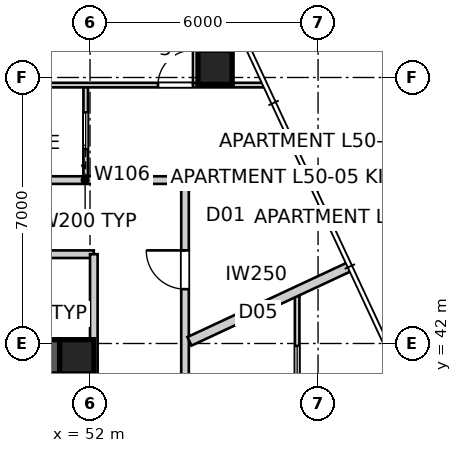
"""IFC4 building model, lengths in metres.
Left out: names, types, materials, properties, quantities, classifications, styles, units other than length and angle.
Written with IfcOpenShell. Run it as: python <this file> out.ifc"""

import sys

from ifc_helpers import new_model, si_unit, direction, frame, frame_2d, origin, origin_2d, place, context, subcontext, project, spatial, polyline, rectangle, outline, extrude, element, fill, save


model = new_model("IFC4")
c1 = context("Model", 3, precision=1e-05, world=origin(), true_north=direction((0.0, 1.0)))
c2 = subcontext(c1, "Body", "Model", "MODEL_VIEW")
j1 = project(units=[si_unit("LENGTHUNIT", "METRE"), si_unit("PLANEANGLEUNIT", "RADIAN")], contexts=[c1])
p1 = place(None, origin())
s1 = spatial("IfcSite", under=j1, at=p1, CompositionType="ELEMENT")
p2 = place(p1, origin())
s2 = spatial("IfcBuilding", under=s1, at=p2, CompositionType="ELEMENT")
p3 = place(p2, frame((0.0, 0.0, 182.8)))
s3 = spatial("IfcBuildingStorey", under=s2, at=p3, CompositionType="ELEMENT", Elevation=182.8)
p4 = place(p3, frame((28.8, 41.65, 0.0), z_axis=(0.0, 0.0, 1.0), x_axis=(1.0, 0.0, 0.0)))
e1 = element("IfcWall", 1, at=p4, inside=s3, PredefinedType="SHEAR", context=c2, shape_type="SweptSolid", body=[
    extrude(outline(polyline([(0.0, -0.45), (22.4, -0.45), (22.4, -0.025), (22.85, -0.025), (22.85, 0.025), (22.4, 0.025), (22.4, 0.45), (0.0, 0.45), (0.0, 0.025), (-0.45, 0.025), (-0.45, -0.025), (0.0, -0.025), (0.0, -0.45)])), origin(), (0.0, 0.0, 1.0), 3.4),
])
p5 = place(p3, frame((51.65, 18.8, 0.0), z_axis=(0.0, 0.0, 1.0), x_axis=(0.0, 1.0, 0.0)))
e2 = element("IfcWall", 2, at=p5, inside=s3, PredefinedType="SHEAR", context=c2, shape_type="SweptSolid", body=[
    extrude(outline(polyline([(0.0, -0.45), (22.4, -0.45), (22.4, -0.025), (22.85, -0.025), (22.85, 0.025), (22.4, 0.025), (22.4, 0.45), (0.0, 0.45), (0.0, 0.025), (-0.45, 0.025), (-0.45, -0.025), (0.0, -0.025), (0.0, -0.45)])), origin(), (0.0, 0.0, 1.0), 3.4),
])
p6 = place(p5, frame((11.14, 0.0, 0.0)))
e3 = element("IfcOpeningElement", 3, at=p6, cuts=e2, PredefinedType="OPENING", context=c2, shape_type="SweptSolid", body=[
    extrude(rectangle(XDim=1.02, YDim=2.4, at=frame_2d((0.51, 1.2))), frame((0.0, 0.46, 0.0), z_axis=(0.0, -1.0, 0.0), x_axis=(1.0, 0.0, 0.0)), (0.0, 0.0, 1.0), 0.92),
])
for number, where, z_axis, x_axis in (
    (4, (51.65, 41.65, 0.0), (0.0, 0.0, 1.0), (1.0, 0.0, 0.0)),
    (5, (55.29, 49.267, 0.0), (0.0, 0.0, 1.0), (1.0, 0.0, 0.0)),
):
    element("IfcColumn", number, at=place(p3, frame(where, z_axis=z_axis, x_axis=x_axis)), inside=s3, PredefinedType="COLUMN", context=c2, shape_type="SweptSolid", body=[
        extrude(rectangle(XDim=0.9, YDim=0.9, at=origin_2d()), origin(), (0.0, 0.0, 1.0), 3.4),
    ])
p7 = place(p3, frame((54.5, 13.7, 0.0), z_axis=(0.0, 0.0, 1.0), x_axis=(0.0, 1.0, 0.0)))
e6 = element("IfcWall", 6, at=p7, inside=s3, PredefinedType="PARTITIONING", context=c2, shape_type="SweptSolid", body=[
    extrude(rectangle(XDim=32.6, YDim=0.2, at=frame_2d((16.3, 0.0))), origin(), (0.0, 0.0, 1.0), 3.25),
])
p8 = place(p7, frame((3.326, 0.0, 0.0)))
e7 = element("IfcOpeningElement", 7, at=p8, cuts=e6, PredefinedType="OPENING", context=c2, shape_type="SweptSolid", body=[
    extrude(rectangle(XDim=1.02, YDim=2.34, at=frame_2d((0.51, 1.17))), frame((0.0, 0.11, 0.0), z_axis=(0.0, -1.0, 0.0), x_axis=(1.0, 0.0, 0.0)), (0.0, 0.0, 1.0), 0.22),
])
p9 = place(p7, frame((19.161, 0.0, 0.0)))
e8 = element("IfcOpeningElement", 8, at=p9, cuts=e6, PredefinedType="OPENING", context=c2, shape_type="SweptSolid", body=[
    extrude(rectangle(XDim=1.02, YDim=2.34, at=frame_2d((0.51, 1.17))), frame((0.0, 0.11, 0.0), z_axis=(0.0, -1.0, 0.0), x_axis=(1.0, 0.0, 0.0)), (0.0, 0.0, 1.0), 0.22),
])
p10 = place(p7, frame((29.73, 0.0, 0.0)))
e9 = element("IfcOpeningElement", 9, at=p10, cuts=e6, PredefinedType="OPENING", context=c2, shape_type="SweptSolid", body=[
    extrude(rectangle(XDim=1.02, YDim=2.34, at=frame_2d((0.51, 1.17))), frame((0.0, 0.11, 0.0), z_axis=(0.0, -1.0, 0.0), x_axis=(1.0, 0.0, 0.0)), (0.0, 0.0, 1.0), 0.22),
])
p11 = place(p7, frame((23.904, 0.0, 0.0)))
e10 = element("IfcOpeningElement", 10, at=p11, cuts=e6, PredefinedType="OPENING", context=c2, shape_type="SweptSolid", body=[
    extrude(rectangle(XDim=1.02, YDim=2.34, at=frame_2d((0.51, 1.17))), frame((0.0, 0.11, 0.0), z_axis=(0.0, -1.0, 0.0), x_axis=(1.0, 0.0, 0.0)), (0.0, 0.0, 1.0), 0.22),
])
p12 = place(p3, frame((54.5, 46.3, 0.0), z_axis=(0.0, 0.0, 1.0), x_axis=(-1.0, 0.0, 0.0)))
e11 = element("IfcWall", 11, at=p12, inside=s3, PredefinedType="PARTITIONING", context=c2, shape_type="SweptSolid", body=[
    extrude(rectangle(XDim=5.258, YDim=0.2, at=frame_2d((2.629, 0.0))), origin(), (0.0, 0.0, 1.0), 3.25),
])
p13 = place(p3, frame((58.838, 44.025, 0.0), z_axis=(0.0, 0.0, 1.0), x_axis=(-0.906317010604, -0.422598481173, 0.0)))
e12 = element("IfcWall", 12, at=p13, inside=s3, PredefinedType="PARTITIONING", context=c2, shape_type="SweptSolid", body=[
    extrude(rectangle(XDim=4.657, YDim=0.25, at=frame_2d((2.329, 0.0))), origin(), (0.0, 0.0, 1.0), 3.25),
])
p14 = place(p3, frame((52.1, 44.35, 0.0), z_axis=(0.0, 0.0, 1.0), x_axis=(-1.0, 0.0, 0.0)))
e13 = element("IfcWall", 13, at=p14, inside=s3, PredefinedType="PARTITIONING", context=c2, shape_type="SweptSolid", body=[
    extrude(rectangle(XDim=24.2, YDim=0.2, at=frame_2d((12.1, 0.0))), origin(), (0.0, 0.0, 1.0), 3.25),
])
p15 = place(p14, frame((18.789, 0.0, 0.0)))
e14 = element("IfcOpeningElement", 14, at=p15, cuts=e13, PredefinedType="OPENING", context=c2, shape_type="SweptSolid", body=[
    extrude(rectangle(XDim=1.02, YDim=2.1, at=frame_2d((0.51, 1.05))), frame((0.0, 0.11, 0.0), z_axis=(0.0, -1.0, 0.0), x_axis=(1.0, 0.0, 0.0)), (0.0, 0.0, 1.0), 0.22),
])
p16 = place(p14, frame((4.391, 0.0, 0.0)))
e15 = element("IfcOpeningElement", 15, at=p16, cuts=e13, PredefinedType="OPENING", context=c2, shape_type="SweptSolid", body=[
    extrude(rectangle(XDim=1.02, YDim=2.1, at=frame_2d((0.51, 1.05))), frame((0.0, 0.11, 0.0), z_axis=(0.0, -1.0, 0.0), x_axis=(1.0, 0.0, 0.0)), (0.0, 0.0, 1.0), 0.22),
])
p17 = place(p14, frame((11.59, 0.0, 0.0)))
e16 = element("IfcOpeningElement", 16, at=p17, cuts=e13, PredefinedType="OPENING", context=c2, shape_type="SweptSolid", body=[
    extrude(rectangle(XDim=1.02, YDim=2.1, at=frame_2d((0.51, 1.05))), frame((0.0, 0.11, 0.0), z_axis=(0.0, -1.0, 0.0), x_axis=(1.0, 0.0, 0.0)), (0.0, 0.0, 1.0), 0.22),
])
p18 = place(p3, frame((52.1, 41.18, 0.0), z_axis=(0.0, 0.0, 1.0), x_axis=(0.0, 1.0, 0.0)))
e17 = element("IfcWall", 17, at=p18, inside=s3, PredefinedType="PARTITIONING", context=c2, shape_type="SweptSolid", body=[
    extrude(rectangle(XDim=3.17, YDim=0.2, at=frame_2d((1.585, 0.0))), origin(), (0.0, 0.0, 1.0), 3.25),
])
p19 = place(p3, frame((57.45, 39.538, 0.0), z_axis=(0.0, 0.0, 1.0), x_axis=(0.0, 1.0, 0.0)))
e18 = element("IfcWall", 18, at=p19, inside=s3, PredefinedType="PARTITIONING", context=c2, shape_type="SweptSolid", body=[
    extrude(rectangle(XDim=3.84, YDim=0.12, at=frame_2d((1.92, 0.0))), origin(), (0.0, 0.0, 1.0), 3.25),
])
p20 = place(p19, frame((1.44, 0.0, 0.0)))
e19 = element("IfcOpeningElement", 19, at=p20, cuts=e18, PredefinedType="OPENING", context=c2, shape_type="SweptSolid", body=[
    extrude(rectangle(XDim=0.96, YDim=2.1, at=frame_2d((0.48, 1.05))), frame((0.0, 0.07, 0.0), z_axis=(0.0, -1.0, 0.0), x_axis=(1.0, 0.0, 0.0)), (0.0, 0.0, 1.0), 0.14),
])
p21 = place(p3, frame((51.886, 46.4, 0.0), z_axis=(0.0, 0.0, 1.0), x_axis=(0.0, 1.0, 0.0)))
e20 = element("IfcWall", 20, at=p21, inside=s3, PredefinedType="PARTITIONING", context=c2, shape_type="SweptSolid", body=[
    extrude(rectangle(XDim=2.4, YDim=0.12, at=frame_2d((1.2, 0.0))), origin(), (0.0, 0.0, 1.0), 3.25),
])
p22 = place(p21, frame((0.72, 0.0, 0.0)))
e21 = element("IfcOpeningElement", 21, at=p22, cuts=e20, PredefinedType="OPENING", context=c2, shape_type="SweptSolid", body=[
    extrude(rectangle(XDim=0.96, YDim=2.1, at=frame_2d((0.48, 1.05))), frame((0.0, 0.07, 0.0), z_axis=(0.0, -1.0, 0.0), x_axis=(1.0, 0.0, 0.0)), (0.0, 0.0, 1.0), 0.14),
])
p23 = place(p3, frame((46.783, 48.8, 0.0), z_axis=(0.0, 0.0, 1.0), x_axis=(1.0, 0.0, 0.0)))
e22 = element("IfcWall", 22, at=p23, inside=s3, PredefinedType="PARTITIONING", context=c2, shape_type="SweptSolid", body=[
    extrude(rectangle(XDim=9.784, YDim=0.12, at=frame_2d((4.892, 0.0))), origin(), (0.0, 0.0, 1.0), 3.25),
])
p24 = place(p23, frame((7.006, 0.0, 0.0)))
e23 = element("IfcOpeningElement", 23, at=p24, cuts=e22, PredefinedType="OPENING", context=c2, shape_type="SweptSolid", body=[
    extrude(rectangle(XDim=0.92, YDim=2.34, at=frame_2d((0.46, 1.17))), frame((0.0, 0.07, 0.0), z_axis=(0.0, -1.0, 0.0), x_axis=(1.0, 0.0, 0.0)), (0.0, 0.0, 1.0), 0.14),
])
p25 = place(p3, frame((54.787, 52.618, 0.0), z_axis=(0.0, 0.0, 1.0), x_axis=(-0.906314140712, -0.422604635972, 0.0)))
e24 = element("IfcWall", 24, at=p25, inside=s3, PredefinedType="PARTITIONING", context=c2, shape_type="SweptSolid", body=[
    extrude(rectangle(XDim=8.71, YDim=0.12, at=frame_2d((4.355, 0.0))), origin(), (0.0, 0.0, 1.0), 3.25),
])
p26 = place(p25, frame((3.875, 0.0, 0.0)))
e25 = element("IfcOpeningElement", 25, at=p26, cuts=e24, PredefinedType="OPENING", context=c2, shape_type="SweptSolid", body=[
    extrude(rectangle(XDim=0.92, YDim=2.34, at=frame_2d((0.46, 1.17))), frame((0.0, 0.07, 0.0), z_axis=(0.0, -1.0, 0.0), x_axis=(1.0, 0.0, 0.0)), (0.0, 0.0, 1.0), 0.14),
])
p27 = place(p10, origin())
e26 = element("IfcDoor", 26, at=p27, inside=s3, OperationType="SINGLE_SWING_RIGHT", PredefinedType="DOOR", context=c2, shape_type="SweptSolid", body=[
    extrude(rectangle(XDim=1.02, YDim=2.34, at=frame_2d((0.51, 1.17))), frame((0.0, 0.025, 0.0), z_axis=(0.0, -1.0, 0.0), x_axis=(1.0, 0.0, 0.0)), (0.0, 0.0, 1.0), 0.05),
])
fill(e9, e26)
p28 = place(p24, origin())
e27 = element("IfcDoor", 27, at=p28, inside=s3, OperationType="SINGLE_SWING_RIGHT", PredefinedType="DOOR", context=c2, shape_type="SweptSolid", body=[
    extrude(rectangle(XDim=0.92, YDim=2.34, at=frame_2d((0.46, 1.17))), frame((0.0, 0.025, 0.0), z_axis=(0.0, -1.0, 0.0), x_axis=(1.0, 0.0, 0.0)), (0.0, 0.0, 1.0), 0.05),
])
fill(e23, e27)
p29 = place(p22, origin())
e28 = element("IfcDoor", 28, at=p29, inside=s3, OperationType="SLIDING_TO_LEFT", PredefinedType="DOOR", context=c2, shape_type="SweptSolid", body=[
    extrude(rectangle(XDim=0.96, YDim=2.1, at=frame_2d((0.48, 1.05))), frame((0.0, 0.025, 0.0), z_axis=(0.0, -1.0, 0.0), x_axis=(1.0, 0.0, 0.0)), (0.0, 0.0, 1.0), 0.05),
])
fill(e21, e28)
p30 = place(p20, origin())
e29 = element("IfcDoor", 29, at=p30, inside=s3, OperationType="SLIDING_TO_LEFT", PredefinedType="DOOR", context=c2, shape_type="SweptSolid", body=[
    extrude(rectangle(XDim=0.96, YDim=2.1, at=frame_2d((0.48, 1.05))), frame((0.0, 0.025, 0.0), z_axis=(0.0, -1.0, 0.0), x_axis=(1.0, 0.0, 0.0)), (0.0, 0.0, 1.0), 0.05),
])
fill(e19, e29)
save(model, sys.argv[1])
